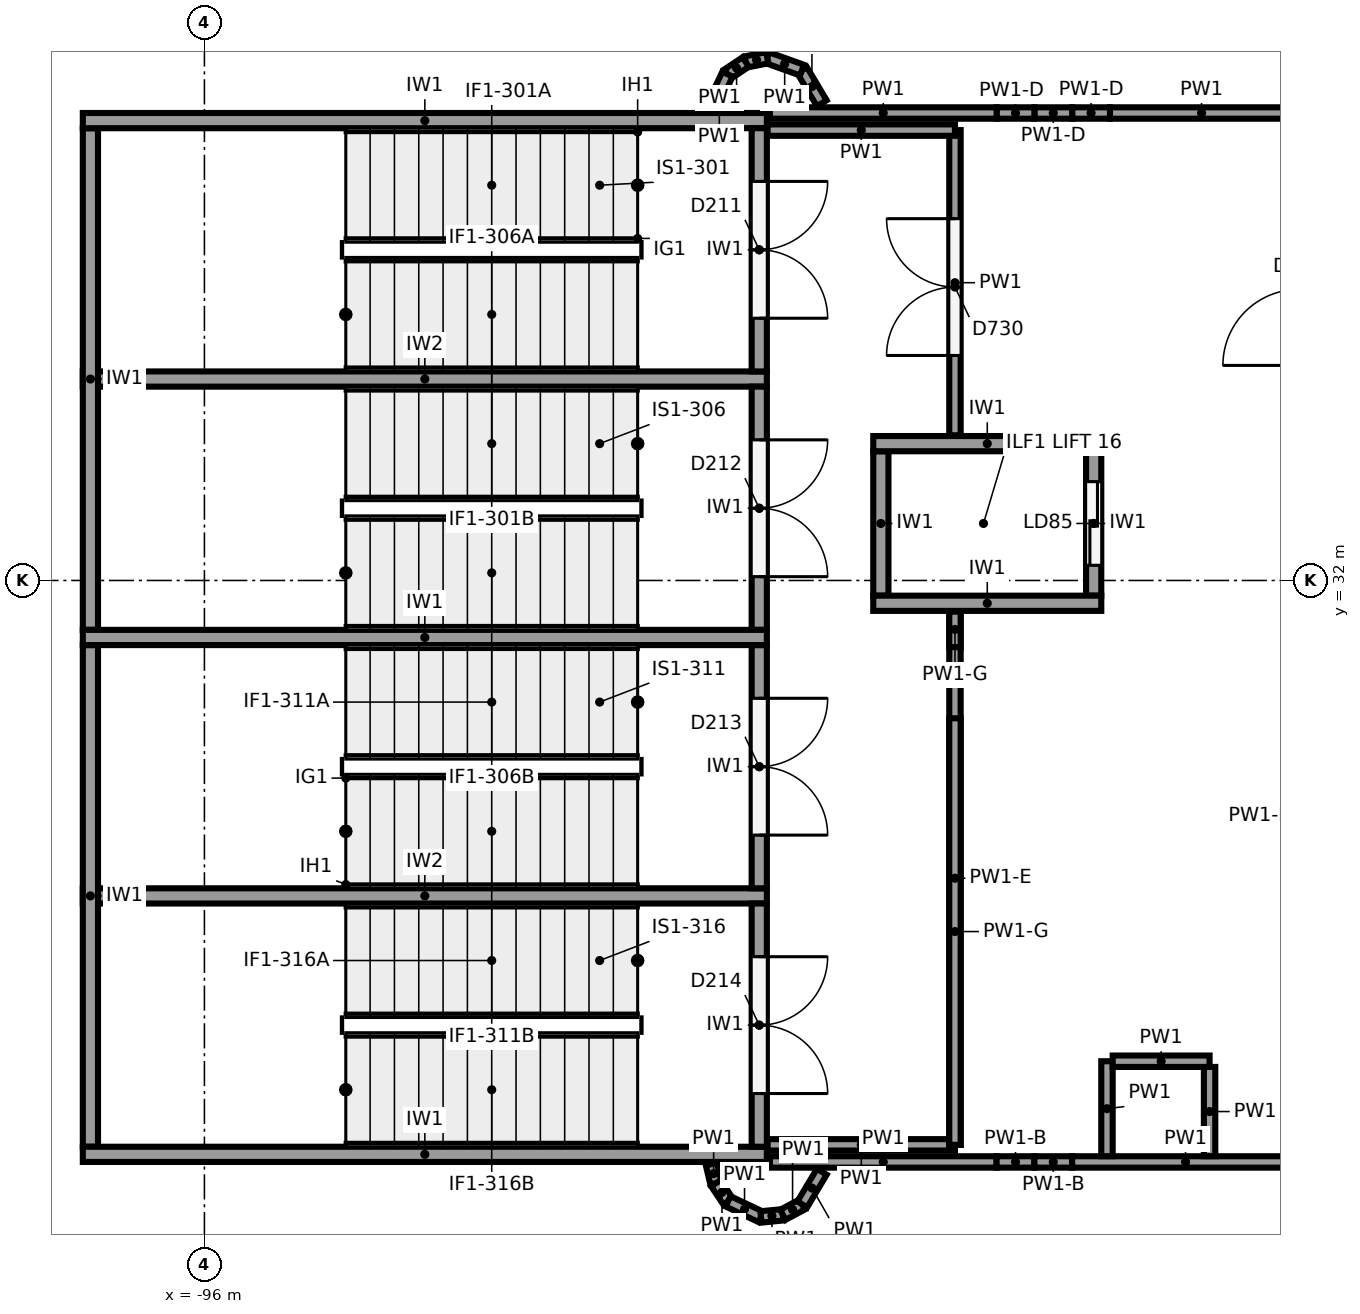
"""IFC4 building model, lengths in metres.
Left out: names, types, materials, properties, quantities, classifications, styles, units other than length and angle.
Written with IfcOpenShell. Run it as: python <this file> out.ifc"""

import sys

from ifc_helpers import new_model, si_unit, direction, frame, frame_2d, origin, origin_2d, place, context, subcontext, project, spatial, rectangle, circle, extrude, element, fill, save


model = new_model("IFC4")
c1 = context("Model", 3, precision=1e-05, world=origin(), true_north=direction((0.0, 1.0)))
c2 = subcontext(c1, "Body", "Model", "MODEL_VIEW")
j1 = project(units=[si_unit("LENGTHUNIT", "METRE"), si_unit("PLANEANGLEUNIT", "RADIAN")], contexts=[c1])
p1 = place(None, origin())
s1 = spatial("IfcSite", under=j1, at=p1, CompositionType="ELEMENT")
p2 = place(p1, origin())
s2 = spatial("IfcBuilding", under=s1, at=p2, CompositionType="ELEMENT")
p3 = place(p2, frame((0.0, 0.0, -4.0)))
s3 = spatial("IfcBuildingStorey", under=s2, at=p3, CompositionType="ELEMENT", Elevation=-4.0)
p4 = place(p3, frame((-84.941, 30.404, -1.2), z_axis=(0.0, 0.0, 1.0), x_axis=(1.0, 0.0, 0.0)))
e1 = element("IfcColumn", 1, at=p4, inside=s3, PredefinedType="COLUMN", context=c2, shape_type="SweptSolid", body=[
    extrude(circle(Radius=0.6, at=origin_2d()), origin(), (0.0, 0.0, 1.0), 5.2),
])
for number, where, z_axis, x_axis in (
    (2, (-97.6, 38.05, -1.2), (0.0, 0.0, 1.0), (1.0, 0.0, 0.0)),
    (3, (-97.6, 31.25, -1.2), (0.0, 0.0, 1.0), (1.0, 0.0, 0.0)),
    (4, (-97.6, 24.45, -1.2), (0.0, 0.0, 1.0), (1.0, 0.0, 0.0)),
):
    element("IfcWall", number, at=place(p3, frame(where, z_axis=z_axis, x_axis=x_axis)), inside=s3, PredefinedType="SHEAR", context=c2, shape_type="SweptSolid", body=[
        extrude(rectangle(XDim=9.0, YDim=0.2, at=frame_2d((4.5, 0.0))), origin(), (0.0, 0.0, 1.0), 4.8),
    ])
for number, where, z_axis, x_axis in (
    (5, (-97.5, 37.95, -1.2), (0.0, 0.0, 1.0), (0.0, -1.0, 0.0)),
    (6, (-97.5, 31.15, -1.2), (0.0, 0.0, 1.0), (0.0, -1.0, 0.0)),
):
    element("IfcWall", number, at=place(p3, frame(where, z_axis=z_axis, x_axis=x_axis)), inside=s3, PredefinedType="SHEAR", context=c2, shape_type="SweptSolid", body=[
        extrude(rectangle(XDim=6.6, YDim=0.2, at=frame_2d((3.3, 0.0))), origin(), (0.0, 0.0, 1.0), 4.8),
    ])
for number, where, z_axis, x_axis in (
    (7, (-97.6, 34.65, -1.2), (0.0, 0.0, 1.0), (1.0, 0.0, 0.0)),
    (8, (-97.6, 27.85, -1.2), (0.0, 0.0, 1.0), (1.0, 0.0, 0.0)),
):
    element("IfcWall", number, at=place(p3, frame(where, z_axis=z_axis, x_axis=x_axis)), inside=s3, PredefinedType="SHEAR", context=c2, shape_type="SweptSolid", body=[
        extrude(rectangle(XDim=9.0, YDim=0.2, at=frame_2d((4.5, 0.0))), origin(), (0.0, 0.0, 1.0), 4.8),
    ])
p5 = place(p3, frame((-88.7, 37.95, -1.2), z_axis=(0.0, 0.0, 1.0), x_axis=(0.0, -1.0, 0.0)))
e9 = element("IfcWall", 9, at=p5, inside=s3, PredefinedType="SHEAR", context=c2, shape_type="SweptSolid", body=[
    extrude(rectangle(XDim=3.2, YDim=0.2, at=frame_2d((1.6, 0.0))), origin(), (0.0, 0.0, 1.0), 4.8),
])
p6 = place(p5, frame((0.7, 0.0, 1.2)))
e10 = element("IfcOpeningElement", 10, at=p6, cuts=e9, PredefinedType="OPENING", context=c2, shape_type="SweptSolid", body=[
    extrude(rectangle(XDim=1.8, YDim=2.1, at=frame_2d((0.9, 1.05))), frame((0.0, 0.11, 0.0), z_axis=(0.0, -1.0, 0.0), x_axis=(1.0, 0.0, 0.0)), (0.0, 0.0, 1.0), 0.22),
])
p7 = place(p3, frame((-88.7, 34.55, -1.2), z_axis=(0.0, 0.0, 1.0), x_axis=(0.0, -1.0, 0.0)))
e11 = element("IfcWall", 11, at=p7, inside=s3, PredefinedType="SHEAR", context=c2, shape_type="SweptSolid", body=[
    extrude(rectangle(XDim=3.2, YDim=0.2, at=frame_2d((1.6, 0.0))), origin(), (0.0, 0.0, 1.0), 4.8),
])
p8 = place(p7, frame((0.7, 0.0, 1.2)))
e12 = element("IfcOpeningElement", 12, at=p8, cuts=e11, PredefinedType="OPENING", context=c2, shape_type="SweptSolid", body=[
    extrude(rectangle(XDim=1.8, YDim=2.1, at=frame_2d((0.9, 1.05))), frame((0.0, 0.11, 0.0), z_axis=(0.0, -1.0, 0.0), x_axis=(1.0, 0.0, 0.0)), (0.0, 0.0, 1.0), 0.22),
])
p9 = place(p3, frame((-88.7, 31.15, -1.2), z_axis=(0.0, 0.0, 1.0), x_axis=(0.0, -1.0, 0.0)))
e13 = element("IfcWall", 13, at=p9, inside=s3, PredefinedType="SHEAR", context=c2, shape_type="SweptSolid", body=[
    extrude(rectangle(XDim=3.2, YDim=0.2, at=frame_2d((1.6, 0.0))), origin(), (0.0, 0.0, 1.0), 4.8),
])
p10 = place(p9, frame((0.7, 0.0, 1.2)))
e14 = element("IfcOpeningElement", 14, at=p10, cuts=e13, PredefinedType="OPENING", context=c2, shape_type="SweptSolid", body=[
    extrude(rectangle(XDim=1.8, YDim=2.1, at=frame_2d((0.9, 1.05))), frame((0.0, 0.11, 0.0), z_axis=(0.0, -1.0, 0.0), x_axis=(1.0, 0.0, 0.0)), (0.0, 0.0, 1.0), 0.22),
])
p11 = place(p3, frame((-88.7, 27.75, -1.2), z_axis=(0.0, 0.0, 1.0), x_axis=(0.0, -1.0, 0.0)))
e15 = element("IfcWall", 15, at=p11, inside=s3, PredefinedType="SHEAR", context=c2, shape_type="SweptSolid", body=[
    extrude(rectangle(XDim=3.2, YDim=0.2, at=frame_2d((1.6, 0.0))), origin(), (0.0, 0.0, 1.0), 4.8),
])
p12 = place(p11, frame((0.7, 0.0, 1.2)))
e16 = element("IfcOpeningElement", 16, at=p12, cuts=e15, PredefinedType="OPENING", context=c2, shape_type="SweptSolid", body=[
    extrude(rectangle(XDim=1.8, YDim=2.1, at=frame_2d((0.9, 1.05))), frame((0.0, 0.11, 0.0), z_axis=(0.0, -1.0, 0.0), x_axis=(1.0, 0.0, 0.0)), (0.0, 0.0, 1.0), 0.22),
])
for number, where, z_axis, x_axis in (
    (17, (-87.2, 33.8, -1.2), (0.0, 0.0, 1.0), (1.0, 0.0, 0.0)),
    (18, (-87.2, 31.7, -1.2), (0.0, 0.0, 1.0), (1.0, 0.0, 0.0)),
):
    element("IfcWall", number, at=place(p3, frame(where, z_axis=z_axis, x_axis=x_axis)), inside=s3, PredefinedType="SHEAR", context=c2, shape_type="SweptSolid", body=[
        extrude(rectangle(XDim=3.0, YDim=0.2, at=frame_2d((1.5, 0.0))), origin(), (0.0, 0.0, 1.0), 4.8),
    ])
p13 = place(p3, frame((-87.1, 33.7, -1.2), z_axis=(0.0, 0.0, 1.0), x_axis=(0.0, -1.0, 0.0)))
e19 = element("IfcWall", 19, at=p13, inside=s3, PredefinedType="SHEAR", context=c2, shape_type="SweptSolid", body=[
    extrude(rectangle(XDim=1.9, YDim=0.2, at=frame_2d((0.95, 0.0))), origin(), (0.0, 0.0, 1.0), 4.8),
])
p14 = place(p3, frame((-84.3, 33.7, -1.2), z_axis=(0.0, 0.0, 1.0), x_axis=(0.0, -1.0, 0.0)))
e20 = element("IfcWall", 20, at=p14, inside=s3, PredefinedType="SHEAR", context=c2, shape_type="SweptSolid", body=[
    extrude(rectangle(XDim=1.9, YDim=0.2, at=frame_2d((0.95, 0.0))), origin(), (0.0, 0.0, 1.0), 4.8),
])
p15 = place(p14, frame((0.4, 0.0, 1.2)))
e21 = element("IfcOpeningElement", 21, at=p15, cuts=e20, PredefinedType="OPENING", context=c2, shape_type="SweptSolid", body=[
    extrude(rectangle(XDim=1.1, YDim=2.1, at=frame_2d((0.55, 1.05))), frame((0.0, 0.11, 0.0), z_axis=(0.0, -1.0, 0.0), x_axis=(1.0, 0.0, 0.0)), (0.0, 0.0, 1.0), 0.22),
])
p16 = place(p3, frame((-81.675, 38.15, 0.0), z_axis=(0.0, 0.0, 1.0), x_axis=(-1.0, 0.0, 0.0)))
e22 = element("IfcWall", 22, at=p16, inside=s3, PredefinedType="PARTITIONING", context=c2, shape_type="SweptSolid", body=[
    extrude(rectangle(XDim=2.411, YDim=0.15, at=frame_2d((1.205, 0.0))), origin(), (0.0, 0.0, 1.0), 3.6),
])
p17 = place(p3, frame((-84.086, 38.15, 0.0), z_axis=(0.0, 0.0, 1.0), x_axis=(-1.0, 0.0, 0.0)))
e23 = element("IfcWall", 23, at=p17, inside=s3, PredefinedType="PARTITIONING", context=c2, shape_type="SweptSolid", body=[
    extrude(rectangle(XDim=0.497, YDim=0.15, at=frame_2d((0.249, 0.0))), origin(), (0.0, 0.0, 1.0), 2.3),
])
for number, where, z_axis, x_axis in (
    (24, (-84.583, 38.15, 0.0), (0.0, 0.0, 1.0), (-1.0, 0.0, 0.0)),
    (25, (-85.08, 38.15, 0.0), (0.0, 0.0, 1.0), (-1.0, 0.0, 0.0)),
):
    element("IfcWall", number, at=place(p3, frame(where, z_axis=z_axis, x_axis=x_axis)), inside=s3, PredefinedType="PARTITIONING", context=c2, shape_type="SweptSolid", body=[
        extrude(rectangle(XDim=0.497, YDim=0.15, at=frame_2d((0.249, 0.0))), origin(), (0.0, 0.0, 1.0), 2.3),
    ])
for number, where, z_axis, x_axis in (
    (26, (-85.577, 38.15, 0.0), (0.0, 0.0, 1.0), (-1.0, 0.0, 0.0)),
    (27, (-88.56, 24.35, 0.0), (0.0, 0.0, 1.0), (1.0, 0.0, 0.0)),
):
    element("IfcWall", number, at=place(p3, frame(where, z_axis=z_axis, x_axis=x_axis)), inside=s3, PredefinedType="PARTITIONING", context=c2, shape_type="SweptSolid", body=[
        extrude(rectangle(XDim=2.983, YDim=0.15, at=frame_2d((1.491, 0.0))), origin(), (0.0, 0.0, 1.0), 3.6),
    ])
for number, where, z_axis, x_axis in (
    (28, (-85.577, 24.35, 0.0), (0.0, 0.0, 1.0), (1.0, 0.0, 0.0)),
    (29, (-85.08, 24.35, 0.0), (0.0, 0.0, 1.0), (1.0, 0.0, 0.0)),
):
    element("IfcWall", number, at=place(p3, frame(where, z_axis=z_axis, x_axis=x_axis)), inside=s3, PredefinedType="PARTITIONING", context=c2, shape_type="SweptSolid", body=[
        extrude(rectangle(XDim=0.497, YDim=0.15, at=frame_2d((0.249, 0.0))), origin(), (0.0, 0.0, 1.0), 2.5),
    ])
p18 = place(p3, frame((-84.583, 24.35, 0.0), z_axis=(0.0, 0.0, 1.0), x_axis=(1.0, 0.0, 0.0)))
e30 = element("IfcWall", 30, at=p18, inside=s3, PredefinedType="PARTITIONING", context=c2, shape_type="SweptSolid", body=[
    extrude(rectangle(XDim=2.983, YDim=0.15, at=frame_2d((1.491, 0.0))), origin(), (0.0, 0.0, 1.0), 3.6),
])
p19 = place(p3, frame((-84.125, 25.675, 0.0), z_axis=(0.0, 0.0, 1.0), x_axis=(0.0, -1.0, 0.0)))
e31 = element("IfcWall", 31, at=p19, inside=s3, PredefinedType="PARTITIONING", context=c2, shape_type="SweptSolid", body=[
    extrude(rectangle(XDim=1.249, YDim=0.15, at=frame_2d((0.625, 0.0))), origin(), (0.0, 0.0, 1.0), 3.6),
])
p20 = place(p3, frame((-82.775, 24.426, 0.0), z_axis=(0.0, 0.0, 1.0), x_axis=(0.0, 1.0, 0.0)))
e32 = element("IfcWall", 32, at=p20, inside=s3, PredefinedType="PARTITIONING", context=c2, shape_type="SweptSolid", body=[
    extrude(rectangle(XDim=1.174, YDim=0.15, at=frame_2d((0.587, 0.0))), origin(), (0.0, 0.0, 1.0), 3.6),
])
p21 = place(p3, frame((-82.775, 25.675, 0.0), z_axis=(0.0, 0.0, 1.0), x_axis=(-1.0, 0.0, 0.0)))
e33 = element("IfcWall", 33, at=p21, inside=s3, PredefinedType="PARTITIONING", context=c2, shape_type="SweptSolid", body=[
    extrude(rectangle(XDim=1.275, YDim=0.15, at=frame_2d((0.638, 0.0))), origin(), (0.0, 0.0, 1.0), 3.6),
])
p22 = place(p3, frame((-88.59, 24.575, 0.0), z_axis=(0.0, 0.0, 1.0), x_axis=(1.0, 0.0, 0.0)))
e34 = element("IfcWall", 34, at=p22, inside=s3, PredefinedType="PARTITIONING", context=c2, shape_type="SweptSolid", body=[
    extrude(rectangle(XDim=2.465, YDim=0.15, at=frame_2d((1.232, 0.0))), origin(), (0.0, 0.0, 1.0), 3.6),
])
p23 = place(p3, frame((-86.125, 24.575, 0.0), z_axis=(0.0, 0.0, 1.0), x_axis=(0.0, 1.0, 0.0)))
e35 = element("IfcWall", 35, at=p23, inside=s3, PredefinedType="PARTITIONING", context=c2, shape_type="SweptSolid", body=[
    extrude(rectangle(XDim=7.015, YDim=0.15, at=frame_2d((3.508, 0.0))), origin(), (0.0, 0.0, 1.0), 2.85),
])
p24 = place(p3, frame((-86.125, 24.575, 2.85), z_axis=(0.0, 0.0, 1.0), x_axis=(0.0, 1.0, 0.0)))
e36 = element("IfcWall", 36, at=p24, inside=s3, PredefinedType="PARTITIONING", context=c2, shape_type="SweptSolid", body=[
    extrude(rectangle(XDim=5.612, YDim=0.15, at=frame_2d((2.806, 0.0))), origin(), (0.0, 0.0, 1.0), 0.75),
])
p25 = place(p3, frame((-86.125, 31.122, 2.85), z_axis=(0.0, 0.0, 1.0), x_axis=(0.0, 1.0, 0.0)))
e37 = element("IfcWall", 37, at=p25, inside=s3, PredefinedType="PARTITIONING", context=c2, shape_type="SweptSolid", body=[
    extrude(rectangle(XDim=0.468, YDim=0.15, at=frame_2d((0.234, 0.0))), origin(), (0.0, 0.0, 1.0), 0.75),
])
p26 = place(p3, frame((-86.125, 33.91, 0.0), z_axis=(0.0, 0.0, 1.0), x_axis=(0.0, 1.0, 0.0)))
e38 = element("IfcWall", 38, at=p26, inside=s3, PredefinedType="PARTITIONING", context=c2, shape_type="SweptSolid", body=[
    extrude(rectangle(XDim=4.015, YDim=0.15, at=frame_2d((2.008, 0.0))), origin(), (0.0, 0.0, 1.0), 3.6),
])
p27 = place(p26, frame((1.05, 0.0, 0.0)))
e39 = element("IfcOpeningElement", 39, at=p27, cuts=e38, PredefinedType="OPENING", context=c2, shape_type="SweptSolid", body=[
    extrude(rectangle(XDim=1.8, YDim=2.1, at=frame_2d((0.9, 1.05))), frame((0.0, 0.085, 0.0), z_axis=(0.0, -1.0, 0.0), x_axis=(1.0, 0.0, 0.0)), (0.0, 0.0, 1.0), 0.17),
])
p28 = place(p3, frame((-86.125, 37.925, 0.0), z_axis=(0.0, 0.0, 1.0), x_axis=(-1.0, 0.0, 0.0)))
e40 = element("IfcWall", 40, at=p28, inside=s3, PredefinedType="PARTITIONING", context=c2, shape_type="SweptSolid", body=[
    extrude(rectangle(XDim=2.465, YDim=0.15, at=frame_2d((1.232, 0.0))), origin(), (0.0, 0.0, 1.0), 3.6),
])
p29 = place(p3, frame((-89.33, 24.322, 0.0), z_axis=(0.0, 0.0, 1.0), x_axis=(0.230253879357, -0.973130593004, 0.0)))
e41 = element("IfcWall", 41, at=p29, inside=s3, PredefinedType="PARTITIONING", context=c2, shape_type="SweptSolid", body=[
    extrude(rectangle(XDim=0.258, YDim=0.15, at=frame_2d((0.129, 0.0))), origin(), (0.0, 0.0, 1.0), 3.6),
])
p30 = place(p3, frame((-89.271, 24.071, 0.0), z_axis=(0.0, 0.0, 1.0), x_axis=(0.555678694372, -0.831397130511, 0.0)))
e42 = element("IfcWall", 42, at=p30, inside=s3, PredefinedType="PARTITIONING", context=c2, shape_type="SweptSolid", body=[
    extrude(rectangle(XDim=0.288, YDim=0.15, at=frame_2d((0.144, 0.0))), origin(), (0.0, 0.0, 1.0), 3.6),
])
p31 = place(p3, frame((-89.111, 23.832, 0.0), z_axis=(0.0, 0.0, 1.0), x_axis=(0.90398642908, -0.427561148889, 0.0)))
e43 = element("IfcWall", 43, at=p31, inside=s3, PredefinedType="PARTITIONING", context=c2, shape_type="SweptSolid", body=[
    extrude(rectangle(XDim=0.48, YDim=0.15, at=frame_2d((0.24, 0.0))), origin(), (0.0, 0.0, 1.0), 3.6),
])
for number, where, z_axis, x_axis in (
    (44, (-88.677, 23.626, 0.0), (0.0, 0.0, 1.0), (0.995, 0.098, 0.0)),
    (45, (-88.389, 23.655, 0.0), (0.0, 0.0, 1.0), (0.882, 0.472, 0.0)),
):
    element("IfcWall", number, at=place(p3, frame(where, z_axis=z_axis, x_axis=x_axis)), inside=s3, PredefinedType="PARTITIONING", context=c2, shape_type="SweptSolid", body=[
        extrude(rectangle(XDim=0.289, YDim=0.15, at=frame_2d((0.145, 0.0))), origin(), (0.0, 0.0, 1.0), 3.6),
    ])
p32 = place(p3, frame((-88.134, 23.791, 0.0), z_axis=(0.0, 0.0, 1.0), x_axis=(0.513060623194, 0.858352373404, 0.0)))
e46 = element("IfcWall", 46, at=p32, inside=s3, PredefinedType="PARTITIONING", context=c2, shape_type="SweptSolid", body=[
    extrude(rectangle(XDim=0.5, YDim=0.15, at=frame_2d((0.25, 0.0))), origin(), (0.0, 0.0, 1.0), 3.6),
])
p33 = place(p3, frame((-87.877, 38.279, 0.0), z_axis=(0.0, 0.0, 1.0), x_axis=(-0.513007387301, 0.858384191709, 0.0)))
e47 = element("IfcWall", 47, at=p33, inside=s3, PredefinedType="PARTITIONING", context=c2, shape_type="SweptSolid", body=[
    extrude(rectangle(XDim=0.507, YDim=0.15, at=frame_2d((0.253, 0.0))), origin(), (0.0, 0.0, 1.0), 3.6),
])
p34 = place(p3, frame((-88.137, 38.714, 0.0), z_axis=(0.0, 0.0, 1.0), x_axis=(-0.941514118829, 0.33697353612, 0.0)))
e48 = element("IfcWall", 48, at=p34, inside=s3, PredefinedType="PARTITIONING", context=c2, shape_type="SweptSolid", body=[
    extrude(rectangle(XDim=0.485, YDim=0.15, at=frame_2d((0.243, 0.0))), origin(), (0.0, 0.0, 1.0), 3.6),
])
p35 = place(p3, frame((-88.594, 38.878, 0.0), z_axis=(0.0, 0.0, 1.0), x_axis=(-0.980677850921, -0.195629631482, 0.0)))
e49 = element("IfcWall", 49, at=p35, inside=s3, PredefinedType="PARTITIONING", context=c2, shape_type="SweptSolid", body=[
    extrude(rectangle(XDim=0.29, YDim=0.15, at=frame_2d((0.145, 0.0))), origin(), (0.0, 0.0, 1.0), 3.6),
])
p36 = place(p3, frame((-88.878, 38.821, 0.0), z_axis=(0.0, 0.0, 1.0), x_axis=(-0.831269669455, -0.555869352136, 0.0)))
e50 = element("IfcWall", 50, at=p36, inside=s3, PredefinedType="PARTITIONING", context=c2, shape_type="SweptSolid", body=[
    extrude(rectangle(XDim=0.289, YDim=0.15, at=frame_2d((0.145, 0.0))), origin(), (0.0, 0.0, 1.0), 3.6),
])
p37 = place(p3, frame((-89.118, 38.66, 0.0), z_axis=(0.0, 0.0, 1.0), x_axis=(-0.427917965102, -0.903817578465, 0.0)))
e51 = element("IfcWall", 51, at=p37, inside=s3, PredefinedType="PARTITIONING", context=c2, shape_type="SweptSolid", body=[
    extrude(rectangle(XDim=0.499, YDim=0.15, at=frame_2d((0.249, 0.0))), origin(), (0.0, 0.0, 1.0), 3.6),
])
p38 = place(p6, origin())
e52 = element("IfcDoor", 52, at=p38, inside=s3, OperationType="DOUBLE_DOOR_SINGLE_SWING", PredefinedType="DOOR", context=c2, shape_type="SweptSolid", body=[
    extrude(rectangle(XDim=1.8, YDim=2.1, at=frame_2d((0.9, 1.05))), frame((0.0, 0.025, 0.0), z_axis=(0.0, -1.0, 0.0), x_axis=(1.0, 0.0, 0.0)), (0.0, 0.0, 1.0), 0.05),
])
fill(e10, e52)
p39 = place(p8, origin())
e53 = element("IfcDoor", 53, at=p39, inside=s3, OperationType="DOUBLE_DOOR_SINGLE_SWING", PredefinedType="DOOR", context=c2, shape_type="SweptSolid", body=[
    extrude(rectangle(XDim=1.8, YDim=2.1, at=frame_2d((0.9, 1.05))), frame((0.0, 0.025, 0.0), z_axis=(0.0, -1.0, 0.0), x_axis=(1.0, 0.0, 0.0)), (0.0, 0.0, 1.0), 0.05),
])
fill(e12, e53)
p40 = place(p10, origin())
e54 = element("IfcDoor", 54, at=p40, inside=s3, OperationType="DOUBLE_DOOR_SINGLE_SWING", PredefinedType="DOOR", context=c2, shape_type="SweptSolid", body=[
    extrude(rectangle(XDim=1.8, YDim=2.1, at=frame_2d((0.9, 1.05))), frame((0.0, 0.025, 0.0), z_axis=(0.0, -1.0, 0.0), x_axis=(1.0, 0.0, 0.0)), (0.0, 0.0, 1.0), 0.05),
])
fill(e14, e54)
p41 = place(p12, origin())
e55 = element("IfcDoor", 55, at=p41, inside=s3, OperationType="DOUBLE_DOOR_SINGLE_SWING", PredefinedType="DOOR", context=c2, shape_type="SweptSolid", body=[
    extrude(rectangle(XDim=1.8, YDim=2.1, at=frame_2d((0.9, 1.05))), frame((0.0, 0.025, 0.0), z_axis=(0.0, -1.0, 0.0), x_axis=(1.0, 0.0, 0.0)), (0.0, 0.0, 1.0), 0.05),
])
fill(e16, e55)
p42 = place(p15, origin())
e56 = element("IfcDoor", 56, at=p42, inside=s3, OperationType="SLIDING_TO_LEFT", PredefinedType="DOOR", context=c2, shape_type="SweptSolid", body=[
    extrude(rectangle(XDim=1.1, YDim=2.1, at=frame_2d((0.55, 1.05))), frame((0.0, 0.025, 0.0), z_axis=(0.0, -1.0, 0.0), x_axis=(1.0, 0.0, 0.0)), (0.0, 0.0, 1.0), 0.05),
])
fill(e21, e56)
p43 = place(p27, origin())
e57 = element("IfcDoor", 57, at=p43, inside=s3, OperationType="DOUBLE_DOOR_SINGLE_SWING", PredefinedType="DOOR", context=c2, shape_type="SweptSolid", body=[
    extrude(rectangle(XDim=1.8, YDim=2.1, at=frame_2d((0.9, 1.05))), frame((0.0, 0.025, 0.0), z_axis=(0.0, -1.0, 0.0), x_axis=(1.0, 0.0, 0.0)), (0.0, 0.0, 1.0), 0.05),
])
fill(e39, e57)
save(model, sys.argv[1])
